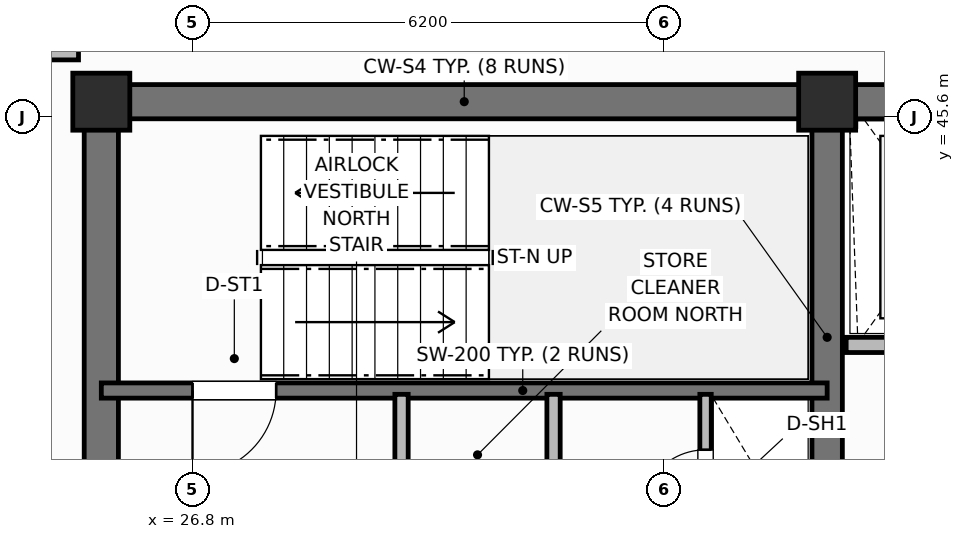
"""IFC4 building model, lengths in metres.
Left out: names, types, materials, properties, quantities, classifications, styles, units other than length and angle.
Written with IfcOpenShell. Run it as: python <this file> out.ifc"""

import sys

from ifc_helpers import new_model, si_unit, direction, frame, frame_2d, origin, origin_2d, place, context, subcontext, project, spatial, rectangle, extrude, element, fill, save


model = new_model("IFC4")
c1 = context("Model", 3, precision=1e-05, world=origin(), true_north=direction((0.0, 1.0)))
c2 = subcontext(c1, "Body", "Model", "MODEL_VIEW")
j1 = project(units=[si_unit("LENGTHUNIT", "METRE"), si_unit("PLANEANGLEUNIT", "RADIAN")], contexts=[c1])
p1 = place(None, origin())
s1 = spatial("IfcSite", under=j1, at=p1, CompositionType="ELEMENT")
p2 = place(p1, origin())
s2 = spatial("IfcBuilding", under=s1, at=p2, CompositionType="ELEMENT")
p3 = place(p2, frame((0.0, 0.0, 293.5)))
s3 = spatial("IfcBuildingStorey", under=s2, at=p3, CompositionType="ELEMENT", Elevation=293.5)
p4 = place(p3, frame((25.6, 45.8, 0.0), z_axis=(0.0, 0.0, 1.0), x_axis=(1.0, 0.0, 0.0)))
e1 = element("IfcWall", 1, at=p4, inside=s3, PredefinedType="SHEAR", context=c2, shape_type="SweptSolid", body=[
    extrude(rectangle(XDim=27.2, YDim=0.45, at=frame_2d((13.6, 0.0))), origin(), (0.0, 0.0, 1.0), 3.7),
])
p5 = place(p3, frame((25.6, 39.825, 0.0), z_axis=(0.0, 0.0, 1.0), x_axis=(0.0, 1.0, 0.0)))
e2 = element("IfcWall", 2, at=p5, inside=s3, PredefinedType="SHEAR", context=c2, shape_type="SweptSolid", body=[
    extrude(rectangle(XDim=5.75, YDim=0.45, at=frame_2d((2.875, 0.0))), origin(), (0.0, 0.0, 1.0), 3.7),
])
p6 = place(p3, frame((35.15, 39.825, 0.0), z_axis=(0.0, 0.0, 1.0), x_axis=(0.0, 1.0, 0.0)))
e3 = element("IfcWall", 3, at=p6, inside=s3, PredefinedType="SHEAR", context=c2, shape_type="SweptSolid", body=[
    extrude(rectangle(XDim=5.75, YDim=0.4, at=frame_2d((2.875, 0.0))), origin(), (0.0, 0.0, 1.0), 3.7),
])
for number, where, z_axis, x_axis in (
    (4, (25.6, 45.8, 0.0), (0.0, 0.0, 1.0), (1.0, 0.0, 0.0)),
    (5, (35.15, 45.8, 0.0), (0.0, 0.0, 1.0), (1.0, 0.0, 0.0)),
):
    element("IfcColumn", number, at=place(p3, frame(where, z_axis=z_axis, x_axis=x_axis)), inside=s3, PredefinedType="COLUMN", context=c2, shape_type="SweptSolid", body=[
        extrude(rectangle(XDim=0.75, YDim=0.75, at=origin_2d()), origin(), (0.0, 0.0, 1.0), 3.7),
    ])
p7 = place(p3, frame((35.15, 42.0, 0.0), z_axis=(0.0, 0.0, 1.0), x_axis=(-1.0, 0.0, 0.0)))
e6 = element("IfcWall", 6, at=p7, inside=s3, PredefinedType="SHEAR", context=c2, shape_type="SweptSolid", body=[
    extrude(rectangle(XDim=9.55, YDim=0.2, at=frame_2d((4.775, 0.0))), origin(), (0.0, 0.0, 1.0), 3.7),
])
p8 = place(p7, frame((7.25, 0.0, 0.0)))
e7 = element("IfcOpeningElement", 7, at=p8, cuts=e6, PredefinedType="OPENING", context=c2, shape_type="SweptSolid", body=[
    extrude(rectangle(XDim=1.1, YDim=2.15, at=frame_2d((0.55, 1.075))), frame((0.0, 0.11, 0.0), z_axis=(0.0, -1.0, 0.0), x_axis=(1.0, 0.0, 0.0)), (0.0, 0.0, 1.0), 0.22),
])
p9 = place(p3, frame((33.55, 39.82, 0.0), z_axis=(0.0, 0.0, 1.0), x_axis=(0.0, 1.0, 0.0)))
e8 = element("IfcWall", 8, at=p9, inside=s3, PredefinedType="PARTITIONING", context=c2, shape_type="SweptSolid", body=[
    extrude(rectangle(XDim=2.13, YDim=0.15, at=frame_2d((1.065, 0.0))), origin(), (0.0, 0.0, 1.0), 2.54),
])
p10 = place(p9, frame((0.55, 0.0, 0.0)))
e9 = element("IfcOpeningElement", 9, at=p10, cuts=e8, PredefinedType="OPENING", context=c2, shape_type="SweptSolid", body=[
    extrude(rectangle(XDim=0.85, YDim=2.05, at=frame_2d((0.425, 1.025))), frame((0.0, 0.085, 0.0), z_axis=(0.0, -1.0, 0.0), x_axis=(1.0, 0.0, 0.0)), (0.0, 0.0, 1.0), 0.17),
])
for number, where, z_axis, x_axis in (
    (10, (29.55, 39.82, 0.0), (0.0, 0.0, 1.0), (0.0, 1.0, 0.0)),
    (11, (31.55, 39.82, 0.0), (0.0, 0.0, 1.0), (0.0, 1.0, 0.0)),
):
    element("IfcWall", number, at=place(p3, frame(where, z_axis=z_axis, x_axis=x_axis)), inside=s3, PredefinedType="PARTITIONING", context=c2, shape_type="SweptSolid", body=[
        extrude(rectangle(XDim=2.13, YDim=0.175, at=frame_2d((1.065, 0.0))), origin(), (0.0, 0.0, 1.0), 2.54),
    ])
p11 = place(p3, frame((37.95, 42.6, 0.0), z_axis=(0.0, 0.0, 1.0), x_axis=(-1.0, 0.0, 0.0)))
e12 = element("IfcWall", 12, at=p11, inside=s3, PredefinedType="PARTITIONING", context=c2, shape_type="SweptSolid", body=[
    extrude(rectangle(XDim=2.55, YDim=0.2, at=frame_2d((1.275, 0.0))), origin(), (0.0, 0.0, 1.0), 2.31),
])
p12 = place(p11, frame((0.75, 0.0, 0.0)))
e13 = element("IfcOpeningElement", 13, at=p12, cuts=e12, PredefinedType="OPENING", context=c2, shape_type="SweptSolid", body=[
    extrude(rectangle(XDim=1.1, YDim=2.15, at=frame_2d((0.55, 1.075))), frame((0.0, 0.11, 0.0), z_axis=(0.0, -1.0, 0.0), x_axis=(1.0, 0.0, 0.0)), (0.0, 0.0, 1.0), 0.22),
])
p13 = place(p3, frame((21.546, 46.45, 0.0), z_axis=(0.0, 0.0, 1.0), x_axis=(1.0, 0.0, 0.0)))
e14 = element("IfcWall", 14, at=p13, inside=s3, PredefinedType="PARTITIONING", context=c2, shape_type="SweptSolid", body=[
    extrude(rectangle(XDim=3.754, YDim=0.2, at=frame_2d((1.877, 0.0))), origin(), (0.0, 0.0, 1.0), 2.54),
])
p14 = place(p8, origin())
e15 = element("IfcDoor", 15, at=p14, inside=s3, OperationType="SINGLE_SWING_RIGHT", PredefinedType="DOOR", context=c2, shape_type="SweptSolid", body=[
    extrude(rectangle(XDim=1.1, YDim=2.15, at=frame_2d((0.55, 1.075))), frame((0.0, 0.025, 0.0), z_axis=(0.0, -1.0, 0.0), x_axis=(1.0, 0.0, 0.0)), (0.0, 0.0, 1.0), 0.05),
])
fill(e7, e15)
p15 = place(p10, origin())
e16 = element("IfcDoor", 16, at=p15, inside=s3, OperationType="SINGLE_SWING_LEFT", PredefinedType="TRAPDOOR", context=c2, shape_type="SweptSolid", body=[
    extrude(rectangle(XDim=0.85, YDim=2.05, at=frame_2d((0.425, 1.025))), frame((0.0, 0.025, 0.0), z_axis=(0.0, -1.0, 0.0), x_axis=(1.0, 0.0, 0.0)), (0.0, 0.0, 1.0), 0.05),
])
fill(e9, e16)
save(model, sys.argv[1])
